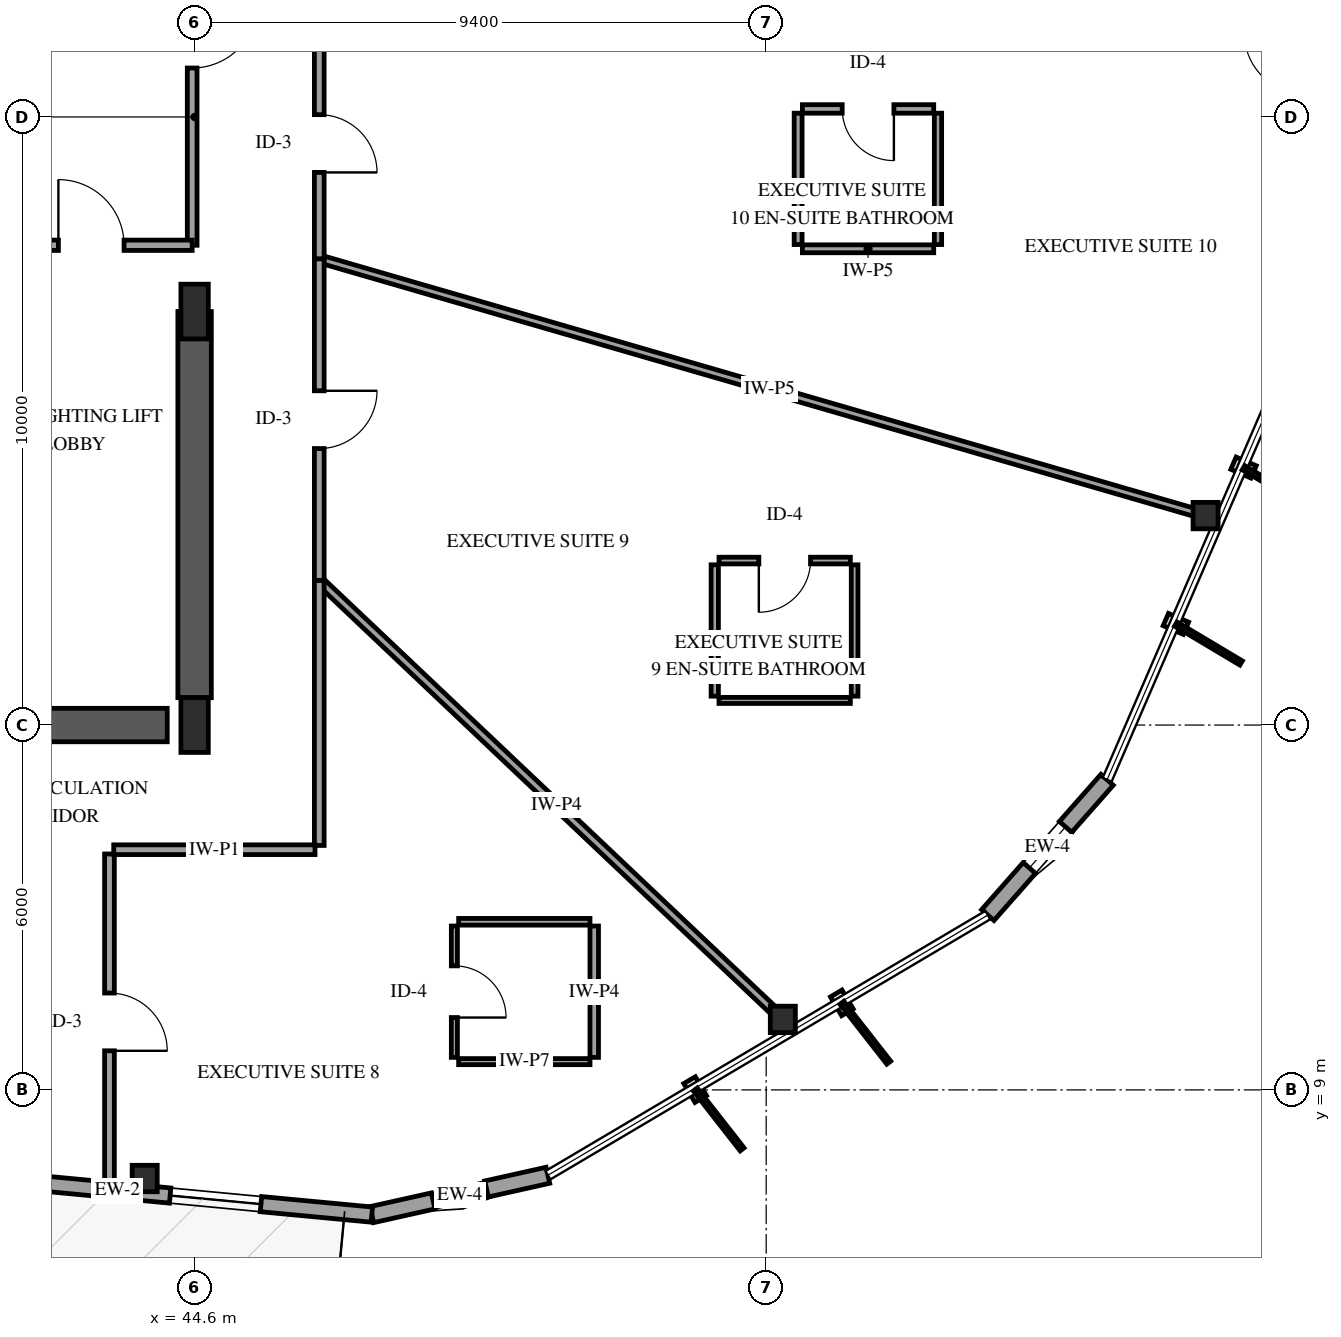
"""IFC4 building model, lengths in metres.
Left out: names, types, materials, properties, quantities, classifications, styles, units other than length and angle.
Written with IfcOpenShell. Run it as: python <this file> out.ifc"""

import sys

from ifc_helpers import new_model, si_unit, direction, frame, frame_2d, origin, origin_2d, place, context, subcontext, project, spatial, rectangle, i_section, extrude, element, fill, save


model = new_model("IFC4")
c1 = context("Model", 3, precision=1e-05, world=origin(), true_north=direction((0.0, 1.0)))
c2 = subcontext(c1, "Body", "Model", "MODEL_VIEW")
j1 = project(units=[si_unit("LENGTHUNIT", "METRE"), si_unit("PLANEANGLEUNIT", "RADIAN")], contexts=[c1])
p1 = place(None, origin())
s1 = spatial("IfcSite", under=j1, at=p1, CompositionType="ELEMENT")
p2 = place(p1, origin())
s2 = spatial("IfcBuilding", under=s1, at=p2, CompositionType="ELEMENT")
p3 = place(p2, frame((0.0, 0.0, 146.2)))
s3 = spatial("IfcBuildingStorey", under=s2, at=p3, CompositionType="ELEMENT", Elevation=146.2)
p4 = place(p3, frame((41.3, 15.0, 0.0), z_axis=(0.0, 0.0, 1.0), x_axis=(1.0, 0.0, 0.0)))
e1 = element("IfcWall", 1, at=p4, inside=s3, PredefinedType="SHEAR", context=c2, shape_type="SweptSolid", body=[
    extrude(rectangle(XDim=2.85, YDim=0.55, at=frame_2d((1.425, 0.0))), origin(), (0.0, 0.0, 1.0), 3.6),
])
p5 = place(p3, frame((44.6, 15.45, 0.0), z_axis=(0.0, 0.0, 1.0), x_axis=(0.0, 1.0, 0.0)))
e2 = element("IfcWall", 2, at=p5, inside=s3, PredefinedType="SHEAR", context=c2, shape_type="SweptSolid", body=[
    extrude(rectangle(XDim=6.35, YDim=0.55, at=frame_2d((3.175, 0.0))), origin(), (0.0, 0.0, 1.0), 3.6),
])
for number, where, z_axis, x_axis in (
    (3, (44.6, 15.0, 0.0), (0.0, 0.0, 1.0), (1.0, 0.0, 0.0)),
    (4, (44.6, 21.8, 0.0), (0.0, 0.0, 1.0), (1.0, 0.0, 0.0)),
):
    element("IfcColumn", number, at=place(p3, frame(where, z_axis=z_axis, x_axis=x_axis)), inside=s3, PredefinedType="PILASTER", context=c2, shape_type="SweptSolid", body=[
        extrude(rectangle(XDim=0.45, YDim=0.9, at=origin_2d()), origin(), (0.0, 0.0, 1.0), 3.6),
    ])
for number, where, z_axis, x_axis in (
    (5, (43.779, 7.542, 0.0), (0.0, 0.0, 1.0), (1.0, 0.0, 0.0)),
    (6, (54.274, 10.159, 0.0), (0.0, 0.0, 1.0), (1.0, 0.0, 0.0)),
    (7, (61.226, 18.444, 0.0), (0.0, 0.0, 1.0), (1.0, 0.0, 0.0)),
):
    element("IfcColumn", number, at=place(p3, frame(where, z_axis=z_axis, x_axis=x_axis)), inside=s3, PredefinedType="COLUMN", context=c2, shape_type="SweptSolid", body=[
        extrude(i_section(OverallWidth=0.412, OverallDepth=0.435, WebThickness=0.036, FlangeThickness=0.057, FilletRadius=0.038, at=origin_2d()), origin(), (0.0, 0.0, 1.0), 3.6),
    ])
p6 = place(p3, frame((47.515, 6.949, 0.0), z_axis=(0.0, 0.0, 1.0), x_axis=(0.975913267769, 0.218158872827, 0.0)))
e8 = element("IfcWall", 8, at=p6, inside=s3, PredefinedType="SOLIDWALL", context=c2, shape_type="SweptSolid", body=[
    extrude(rectangle(XDim=2.967, YDim=0.27, at=frame_2d((1.483, 0.0))), origin(), (0.0, 0.0, 1.0), 2.679),
])
p7 = place(p6, frame((1.033, 0.0, 0.75)))
e9 = element("IfcOpeningElement", 9, at=p7, cuts=e8, PredefinedType="OPENING", context=c2, shape_type="SweptSolid", body=[
    extrude(rectangle(XDim=0.9, YDim=1.5, at=frame_2d((0.45, 0.75))), frame((0.0, 0.145, 0.0), z_axis=(0.0, -1.0, 0.0), x_axis=(1.0, 0.0, 0.0)), (0.0, 0.0, 1.0), 0.29),
])
p8 = place(p3, frame((39.147, 7.74, 0.0), z_axis=(0.0, 0.0, 1.0), x_axis=(0.995561547902, -0.094112721457, 0.0)))
e10 = element("IfcWall", 10, at=p8, inside=s3, PredefinedType="SOLIDWALL", context=c2, shape_type="SweptSolid", body=[
    extrude(rectangle(XDim=8.405, YDim=0.25, at=frame_2d((4.203, 0.0))), origin(), (0.0, 0.0, 1.0), 2.679),
])
p9 = place(p8, frame((0.65, 0.0, 0.0)))
e11 = element("IfcOpeningElement", 11, at=p9, cuts=e10, PredefinedType="OPENING", context=c2, shape_type="SweptSolid", body=[
    extrude(rectangle(XDim=1.0, YDim=2.15, at=frame_2d((0.5, 1.075))), frame((0.0, 0.135, 0.0), z_axis=(0.0, -1.0, 0.0), x_axis=(1.0, 0.0, 0.0)), (0.0, 0.0, 1.0), 0.27),
])
p10 = place(p8, frame((5.073, 0.0, 0.72)))
e12 = element("IfcOpeningElement", 12, at=p10, cuts=e10, PredefinedType="OPENING", context=c2, shape_type="SweptSolid", body=[
    extrude(rectangle(XDim=1.5, YDim=1.7, at=frame_2d((0.75, 0.85))), frame((0.0, 0.135, 0.0), z_axis=(0.0, -1.0, 0.0), x_axis=(1.0, 0.0, 0.0)), (0.0, 0.0, 1.0), 0.27),
])
p11 = place(p3, frame((57.645, 11.875, 0.0), z_axis=(0.0, 0.0, 1.0), x_axis=(0.661354843955, 0.750073176681, 0.0)))
e13 = element("IfcWall", 13, at=p11, inside=s3, PredefinedType="SOLIDWALL", context=c2, shape_type="SweptSolid", body=[
    extrude(rectangle(XDim=2.967, YDim=0.27, at=frame_2d((1.483, 0.0))), origin(), (0.0, 0.0, 1.0), 2.679),
])
p12 = place(p11, frame((1.033, 0.0, 0.75)))
e14 = element("IfcOpeningElement", 14, at=p12, cuts=e13, PredefinedType="OPENING", context=c2, shape_type="SweptSolid", body=[
    extrude(rectangle(XDim=0.9, YDim=1.5, at=frame_2d((0.45, 0.75))), frame((0.0, 0.145, 0.0), z_axis=(0.0, -1.0, 0.0), x_axis=(1.0, 0.0, 0.0)), (0.0, 0.0, 1.0), 0.29),
])
p13 = place(p3, frame((63.224, 24.767, 0.0), z_axis=(0.0, 0.0, 1.0), x_axis=(-0.218148242033, 0.975915644151, 0.0)))
e15 = element("IfcWall", 15, at=p13, inside=s3, PredefinedType="SOLIDWALL", context=c2, shape_type="SweptSolid", body=[
    extrude(rectangle(XDim=8.405, YDim=0.25, at=frame_2d((4.202, 0.0))), origin(), (0.0, 0.0, 1.0), 2.679),
])
p14 = place(p13, frame((0.65, 0.0, 0.0)))
e16 = element("IfcOpeningElement", 16, at=p14, cuts=e15, PredefinedType="OPENING", context=c2, shape_type="SweptSolid", body=[
    extrude(rectangle(XDim=1.0, YDim=2.15, at=frame_2d((0.5, 1.075))), frame((0.0, 0.135, 0.0), z_axis=(0.0, -1.0, 0.0), x_axis=(1.0, 0.0, 0.0)), (0.0, 0.0, 1.0), 0.27),
])
p15 = place(p13, frame((2.29, 0.0, 0.72)))
e17 = element("IfcOpeningElement", 17, at=p15, cuts=e15, PredefinedType="OPENING", context=c2, shape_type="SweptSolid", body=[
    extrude(rectangle(XDim=1.5, YDim=1.7, at=frame_2d((0.75, 0.85))), frame((0.0, 0.135, 0.0), z_axis=(0.0, -1.0, 0.0), x_axis=(1.0, 0.0, 0.0)), (0.0, 0.0, 1.0), 0.27),
])
p16 = place(p3, frame((46.65, 22.668, 0.0), z_axis=(0.0, 0.0, 1.0), x_axis=(0.96048207522, -0.278341845904, 0.0)))
e18 = element("IfcWall", 18, at=p16, inside=s3, PredefinedType="PARTITIONING", context=c2, shape_type="SweptSolid", body=[
    extrude(rectangle(XDim=15.416, YDim=0.13, at=frame_2d((7.708, 0.0))), origin(), (0.0, 0.0, 1.0), 3.3),
])
p17 = place(p3, frame((46.65, 17.377, 0.0), z_axis=(0.0, 0.0, 1.0), x_axis=(0.726163368338, -0.687522190539, 0.0)))
e19 = element("IfcWall", 19, at=p17, inside=s3, PredefinedType="PARTITIONING", context=c2, shape_type="SweptSolid", body=[
    extrude(rectangle(XDim=10.747, YDim=0.14, at=frame_2d((5.374, 0.0))), origin(), (0.0, 0.0, 1.0), 2.595),
])
p18 = place(p3, frame((44.56, 29.8, 0.0), z_axis=(0.0, 0.0, 1.0), x_axis=(0.0, -1.0, 0.0)))
e20 = element("IfcWall", 20, at=p18, inside=s3, PredefinedType="PARTITIONING", context=c2, shape_type="SweptSolid", body=[
    extrude(rectangle(XDim=6.91, YDim=0.16, at=frame_2d((3.455, 0.0))), origin(), (0.0, 0.0, 1.0), 2.34),
])
p19 = place(p18, frame((2.915, 0.0, 0.0)))
e21 = element("IfcOpeningElement", 21, at=p19, cuts=e20, PredefinedType="OPENING", context=c2, shape_type="SweptSolid", body=[
    extrude(rectangle(XDim=1.08, YDim=2.15, at=frame_2d((0.54, 1.075))), frame((0.0, 0.09, 0.0), z_axis=(0.0, -1.0, 0.0), x_axis=(1.0, 0.0, 0.0)), (0.0, 0.0, 1.0), 0.18),
])
p20 = place(p3, frame((43.2, 12.88, 0.0), z_axis=(0.0, 0.0, 1.0), x_axis=(0.0, -1.0, 0.0)))
e22 = element("IfcWall", 22, at=p20, inside=s3, PredefinedType="PARTITIONING", context=c2, shape_type="SweptSolid", body=[
    extrude(rectangle(XDim=5.523, YDim=0.16, at=frame_2d((2.761, 0.0))), origin(), (0.0, 0.0, 1.0), 2.595),
])
p21 = place(p20, frame((2.287, 0.0, 0.0)))
e23 = element("IfcOpeningElement", 23, at=p21, cuts=e22, PredefinedType="OPENING", context=c2, shape_type="SweptSolid", body=[
    extrude(rectangle(XDim=0.95, YDim=2.15, at=frame_2d((0.475, 1.075))), frame((0.0, 0.09, 0.0), z_axis=(0.0, -1.0, 0.0), x_axis=(1.0, 0.0, 0.0)), (0.0, 0.0, 1.0), 0.18),
])
p22 = place(p3, frame((46.65, 22.668, 0.0), z_axis=(0.0, 0.0, 1.0), x_axis=(0.0, -1.0, 0.0)))
e24 = element("IfcWall", 24, at=p22, inside=s3, PredefinedType="PARTITIONING", context=c2, shape_type="SweptSolid", body=[
    extrude(rectangle(XDim=5.291, YDim=0.16, at=frame_2d((2.646, 0.0))), origin(), (0.0, 0.0, 1.0), 3.3),
])
p23 = place(p22, frame((2.171, 0.0, 0.0)))
e25 = element("IfcOpeningElement", 25, at=p23, cuts=e24, PredefinedType="OPENING", context=c2, shape_type="SweptSolid", body=[
    extrude(rectangle(XDim=0.95, YDim=2.15, at=frame_2d((0.475, 1.075))), frame((0.0, 0.09, 0.0), z_axis=(0.0, -1.0, 0.0), x_axis=(1.0, 0.0, 0.0)), (0.0, 0.0, 1.0), 0.18),
])
p24 = place(p3, frame((46.65, 17.377, 0.0), z_axis=(0.0, 0.0, 1.0), x_axis=(0.0, -1.0, 0.0)))
e26 = element("IfcWall", 26, at=p24, inside=s3, PredefinedType="PARTITIONING", context=c2, shape_type="SweptSolid", body=[
    extrude(rectangle(XDim=4.357, YDim=0.16, at=frame_2d((2.178, 0.0))), origin(), (0.0, 0.0, 1.0), 3.3),
])
p25 = place(p3, frame((46.65, 26.458, 0.0), z_axis=(0.0, 0.0, 1.0), x_axis=(0.0, -1.0, 0.0)))
e27 = element("IfcWall", 27, at=p25, inside=s3, PredefinedType="PARTITIONING", context=c2, shape_type="SweptSolid", body=[
    extrude(rectangle(XDim=3.79, YDim=0.16, at=frame_2d((1.895, 0.0))), origin(), (0.0, 0.0, 1.0), 3.3),
])
p26 = place(p25, frame((1.42, 0.0, 0.0)))
e28 = element("IfcOpeningElement", 28, at=p26, cuts=e27, PredefinedType="OPENING", context=c2, shape_type="SweptSolid", body=[
    extrude(rectangle(XDim=0.95, YDim=2.15, at=frame_2d((0.475, 1.075))), frame((0.0, 0.09, 0.0), z_axis=(0.0, -1.0, 0.0), x_axis=(1.0, 0.0, 0.0)), (0.0, 0.0, 1.0), 0.18),
])
p27 = place(p3, frame((41.24, 22.89, 0.0), z_axis=(0.0, 0.0, 1.0), x_axis=(1.0, 0.0, 0.0)))
e29 = element("IfcWall", 29, at=p27, inside=s3, PredefinedType="PARTITIONING", context=c2, shape_type="SweptSolid", body=[
    extrude(rectangle(XDim=3.32, YDim=0.17, at=frame_2d((1.66, 0.0))), origin(), (0.0, 0.0, 1.0), 3.3),
])
p28 = place(p27, frame((1.12, 0.0, 0.0)))
e30 = element("IfcOpeningElement", 30, at=p28, cuts=e29, PredefinedType="OPENING", context=c2, shape_type="SweptSolid", body=[
    extrude(rectangle(XDim=1.08, YDim=2.15, at=frame_2d((0.54, 1.075))), frame((0.0, 0.095, 0.0), z_axis=(0.0, -1.0, 0.0), x_axis=(1.0, 0.0, 0.0)), (0.0, 0.0, 1.0), 0.19),
])
p29 = place(p3, frame((46.58, 12.95, 0.0), z_axis=(0.0, 0.0, 1.0), x_axis=(-1.0, 0.0, 0.0)))
e31 = element("IfcWall", 31, at=p29, inside=s3, PredefinedType="PARTITIONING", context=c2, shape_type="SweptSolid", body=[
    extrude(rectangle(XDim=3.31, YDim=0.16, at=frame_2d((1.655, 0.0))), origin(), (0.0, 0.0, 1.0), 3.3),
])
p30 = place(p3, frame((55.384, 17.705, 0.0), z_axis=(0.0, 0.0, 1.0), x_axis=(-1.0, 0.0, 0.0)))
e32 = element("IfcWall", 32, at=p30, inside=s3, PredefinedType="PARTITIONING", context=c2, shape_type="SweptSolid", body=[
    extrude(rectangle(XDim=2.16, YDim=0.11, at=frame_2d((1.08, 0.0))), origin(), (0.0, 0.0, 1.0), 3.3),
])
p31 = place(p30, frame((0.655, 0.0, 0.0)))
e33 = element("IfcOpeningElement", 33, at=p31, cuts=e32, PredefinedType="OPENING", context=c2, shape_type="SweptSolid", body=[
    extrude(rectangle(XDim=0.85, YDim=2.1, at=frame_2d((0.425, 1.05))), frame((0.0, 0.065, 0.0), z_axis=(0.0, -1.0, 0.0), x_axis=(1.0, 0.0, 0.0)), (0.0, 0.0, 1.0), 0.13),
])
p32 = place(p3, frame((53.224, 15.405, 0.0), z_axis=(0.0, 0.0, 1.0), x_axis=(1.0, 0.0, 0.0)))
e34 = element("IfcWall", 34, at=p32, inside=s3, PredefinedType="PARTITIONING", context=c2, shape_type="SweptSolid", body=[
    extrude(rectangle(XDim=2.16, YDim=0.1, at=frame_2d((1.08, 0.0))), origin(), (0.0, 0.0, 1.0), 3.3),
])
p33 = place(p3, frame((56.755, 25.132, 0.0), z_axis=(0.0, 0.0, 1.0), x_axis=(-1.0, 0.0, 0.0)))
e35 = element("IfcWall", 35, at=p33, inside=s3, PredefinedType="PARTITIONING", context=c2, shape_type="SweptSolid", body=[
    extrude(rectangle(XDim=2.16, YDim=0.14, at=frame_2d((1.08, 0.0))), origin(), (0.0, 0.0, 1.0), 3.3),
])
p34 = place(p33, frame((0.655, 0.0, 0.0)))
e36 = element("IfcOpeningElement", 36, at=p34, cuts=e35, PredefinedType="OPENING", context=c2, shape_type="SweptSolid", body=[
    extrude(rectangle(XDim=0.85, YDim=2.1, at=frame_2d((0.425, 1.05))), frame((0.0, 0.08, 0.0), z_axis=(0.0, -1.0, 0.0), x_axis=(1.0, 0.0, 0.0)), (0.0, 0.0, 1.0), 0.16),
])
p35 = place(p3, frame((54.595, 22.832, 0.0), z_axis=(0.0, 0.0, 1.0), x_axis=(1.0, 0.0, 0.0)))
e37 = element("IfcWall", 37, at=p35, inside=s3, PredefinedType="PARTITIONING", context=c2, shape_type="SweptSolid", body=[
    extrude(rectangle(XDim=2.16, YDim=0.13, at=frame_2d((1.08, 0.0))), origin(), (0.0, 0.0, 1.0), 3.3),
])
p36 = place(p3, frame((53.154, 17.635, 0.0), z_axis=(0.0, 0.0, 1.0), x_axis=(0.0, -1.0, 0.0)))
e38 = element("IfcWall", 38, at=p36, inside=s3, PredefinedType="PARTITIONING", context=c2, shape_type="SweptSolid", body=[
    extrude(rectangle(XDim=2.16, YDim=0.12, at=frame_2d((1.08, 0.0))), origin(), (0.0, 0.0, 1.0), 3.3),
])
p37 = place(p3, frame((55.454, 15.475, 0.0), z_axis=(0.0, 0.0, 1.0), x_axis=(0.0, 1.0, 0.0)))
e39 = element("IfcWall", 39, at=p37, inside=s3, PredefinedType="PARTITIONING", context=c2, shape_type="SweptSolid", body=[
    extrude(rectangle(XDim=2.16, YDim=0.11, at=frame_2d((1.08, 0.0))), origin(), (0.0, 0.0, 1.0), 3.3),
])
p38 = place(p3, frame((48.872, 11.695, 0.0), z_axis=(0.0, 0.0, 1.0), x_axis=(0.0, -1.0, 0.0)))
e40 = element("IfcWall", 40, at=p38, inside=s3, PredefinedType="PARTITIONING", context=c2, shape_type="SweptSolid", body=[
    extrude(rectangle(XDim=2.16, YDim=0.1, at=frame_2d((1.08, 0.0))), origin(), (0.0, 0.0, 1.0), 3.3),
])
p39 = place(p38, frame((0.655, 0.0, 0.0)))
e41 = element("IfcOpeningElement", 41, at=p39, cuts=e40, PredefinedType="OPENING", context=c2, shape_type="SweptSolid", body=[
    extrude(rectangle(XDim=0.85, YDim=2.1, at=frame_2d((0.425, 1.05))), frame((0.0, 0.06, 0.0), z_axis=(0.0, -1.0, 0.0), x_axis=(1.0, 0.0, 0.0)), (0.0, 0.0, 1.0), 0.12),
])
p40 = place(p3, frame((51.172, 9.535, 0.0), z_axis=(0.0, 0.0, 1.0), x_axis=(0.0, 1.0, 0.0)))
e42 = element("IfcWall", 42, at=p40, inside=s3, PredefinedType="PARTITIONING", context=c2, shape_type="SweptSolid", body=[
    extrude(rectangle(XDim=2.16, YDim=0.14, at=frame_2d((1.08, 0.0))), origin(), (0.0, 0.0, 1.0), 3.3),
])
p41 = place(p3, frame((54.525, 25.062, 0.0), z_axis=(0.0, 0.0, 1.0), x_axis=(0.0, -1.0, 0.0)))
e43 = element("IfcWall", 43, at=p41, inside=s3, PredefinedType="PARTITIONING", context=c2, shape_type="SweptSolid", body=[
    extrude(rectangle(XDim=2.16, YDim=0.13, at=frame_2d((1.08, 0.0))), origin(), (0.0, 0.0, 1.0), 3.3),
])
p42 = place(p3, frame((56.825, 22.902, 0.0), z_axis=(0.0, 0.0, 1.0), x_axis=(0.0, 1.0, 0.0)))
e44 = element("IfcWall", 44, at=p42, inside=s3, PredefinedType="PARTITIONING", context=c2, shape_type="SweptSolid", body=[
    extrude(rectangle(XDim=2.16, YDim=0.12, at=frame_2d((1.08, 0.0))), origin(), (0.0, 0.0, 1.0), 3.3),
])
p43 = place(p3, frame((51.102, 11.765, 0.0), z_axis=(0.0, 0.0, 1.0), x_axis=(-1.0, 0.0, 0.0)))
e45 = element("IfcWall", 45, at=p43, inside=s3, PredefinedType="PARTITIONING", context=c2, shape_type="SweptSolid", body=[
    extrude(rectangle(XDim=2.16, YDim=0.11, at=frame_2d((1.08, 0.0))), origin(), (0.0, 0.0, 1.0), 3.3),
])
p44 = place(p3, frame((48.942, 9.465, 0.0), z_axis=(0.0, 0.0, 1.0), x_axis=(1.0, 0.0, 0.0)))
e46 = element("IfcWall", 46, at=p44, inside=s3, PredefinedType="PARTITIONING", context=c2, shape_type="SweptSolid", body=[
    extrude(rectangle(XDim=2.16, YDim=0.1, at=frame_2d((1.08, 0.0))), origin(), (0.0, 0.0, 1.0), 2.511),
])
p45 = place(p7, origin())
e47 = element("IfcWindow", 47, at=p45, inside=s3, PartitioningType="SINGLE_PANEL", PredefinedType="WINDOW", context=c2, shape_type="SweptSolid", body=[
    extrude(rectangle(XDim=0.9, YDim=1.5, at=frame_2d((0.45, 0.75))), frame((0.0, 0.03, 0.0), z_axis=(0.0, -1.0, 0.0), x_axis=(1.0, 0.0, 0.0)), (0.0, 0.0, 1.0), 0.06),
])
fill(e9, e47)
p46 = place(p10, origin())
e48 = element("IfcWindow", 48, at=p46, inside=s3, PartitioningType="SINGLE_PANEL", PredefinedType="WINDOW", context=c2, shape_type="SweptSolid", body=[
    extrude(rectangle(XDim=1.5, YDim=1.7, at=frame_2d((0.75, 0.85))), frame((0.0, 0.03, 0.0), z_axis=(0.0, -1.0, 0.0), x_axis=(1.0, 0.0, 0.0)), (0.0, 0.0, 1.0), 0.06),
])
fill(e12, e48)
p47 = place(p12, origin())
e49 = element("IfcWindow", 49, at=p47, inside=s3, PartitioningType="SINGLE_PANEL", PredefinedType="WINDOW", context=c2, shape_type="SweptSolid", body=[
    extrude(rectangle(XDim=0.9, YDim=1.5, at=frame_2d((0.45, 0.75))), frame((0.0, 0.03, 0.0), z_axis=(0.0, -1.0, 0.0), x_axis=(1.0, 0.0, 0.0)), (0.0, 0.0, 1.0), 0.06),
])
fill(e14, e49)
p48 = place(p19, origin())
e50 = element("IfcDoor", 50, at=p48, inside=s3, OperationType="SINGLE_SWING_LEFT", PredefinedType="DOOR", context=c2, shape_type="SweptSolid", body=[
    extrude(rectangle(XDim=1.08, YDim=2.15, at=frame_2d((0.54, 1.075))), frame((0.0, 0.025, 0.0), z_axis=(0.0, -1.0, 0.0), x_axis=(1.0, 0.0, 0.0)), (0.0, 0.0, 1.0), 0.05),
])
fill(e21, e50)
p49 = place(p21, origin())
e51 = element("IfcDoor", 51, at=p49, inside=s3, OperationType="SINGLE_SWING_RIGHT", PredefinedType="DOOR", context=c2, shape_type="SweptSolid", body=[
    extrude(rectangle(XDim=0.95, YDim=2.15, at=frame_2d((0.475, 1.075))), frame((0.0, 0.025, 0.0), z_axis=(0.0, -1.0, 0.0), x_axis=(1.0, 0.0, 0.0)), (0.0, 0.0, 1.0), 0.05),
])
fill(e23, e51)
p50 = place(p23, origin())
e52 = element("IfcDoor", 52, at=p50, inside=s3, OperationType="SINGLE_SWING_LEFT", PredefinedType="DOOR", context=c2, shape_type="SweptSolid", body=[
    extrude(rectangle(XDim=0.95, YDim=2.15, at=frame_2d((0.475, 1.075))), frame((0.0, 0.025, 0.0), z_axis=(0.0, -1.0, 0.0), x_axis=(1.0, 0.0, 0.0)), (0.0, 0.0, 1.0), 0.05),
])
fill(e25, e52)
p51 = place(p26, origin())
e53 = element("IfcDoor", 53, at=p51, inside=s3, OperationType="SINGLE_SWING_RIGHT", PredefinedType="DOOR", context=c2, shape_type="SweptSolid", body=[
    extrude(rectangle(XDim=0.95, YDim=2.15, at=frame_2d((0.475, 1.075))), frame((0.0, 0.025, 0.0), z_axis=(0.0, -1.0, 0.0), x_axis=(1.0, 0.0, 0.0)), (0.0, 0.0, 1.0), 0.05),
])
fill(e28, e53)
p52 = place(p28, origin())
e54 = element("IfcDoor", 54, at=p52, inside=s3, OperationType="SINGLE_SWING_LEFT", PredefinedType="DOOR", context=c2, shape_type="SweptSolid", body=[
    extrude(rectangle(XDim=1.08, YDim=2.15, at=frame_2d((0.54, 1.075))), frame((0.0, 0.025, 0.0), z_axis=(0.0, -1.0, 0.0), x_axis=(1.0, 0.0, 0.0)), (0.0, 0.0, 1.0), 0.05),
])
fill(e30, e54)
p53 = place(p31, origin())
e55 = element("IfcDoor", 55, at=p53, inside=s3, OperationType="SINGLE_SWING_RIGHT", PredefinedType="DOOR", context=c2, shape_type="SweptSolid", body=[
    extrude(rectangle(XDim=0.85, YDim=2.1, at=frame_2d((0.425, 1.05))), frame((0.0, 0.025, 0.0), z_axis=(0.0, -1.0, 0.0), x_axis=(1.0, 0.0, 0.0)), (0.0, 0.0, 1.0), 0.05),
])
fill(e33, e55)
p54 = place(p34, origin())
e56 = element("IfcDoor", 56, at=p54, inside=s3, OperationType="SINGLE_SWING_LEFT", PredefinedType="DOOR", context=c2, shape_type="SweptSolid", body=[
    extrude(rectangle(XDim=0.85, YDim=2.1, at=frame_2d((0.425, 1.05))), frame((0.0, 0.025, 0.0), z_axis=(0.0, -1.0, 0.0), x_axis=(1.0, 0.0, 0.0)), (0.0, 0.0, 1.0), 0.05),
])
fill(e36, e56)
p55 = place(p39, origin())
e57 = element("IfcDoor", 57, at=p55, inside=s3, OperationType="SINGLE_SWING_RIGHT", PredefinedType="DOOR", context=c2, shape_type="SweptSolid", body=[
    extrude(rectangle(XDim=0.85, YDim=2.1, at=frame_2d((0.425, 1.05))), frame((0.0, 0.025, 0.0), z_axis=(0.0, -1.0, 0.0), x_axis=(1.0, 0.0, 0.0)), (0.0, 0.0, 1.0), 0.05),
])
fill(e41, e57)
save(model, sys.argv[1])
